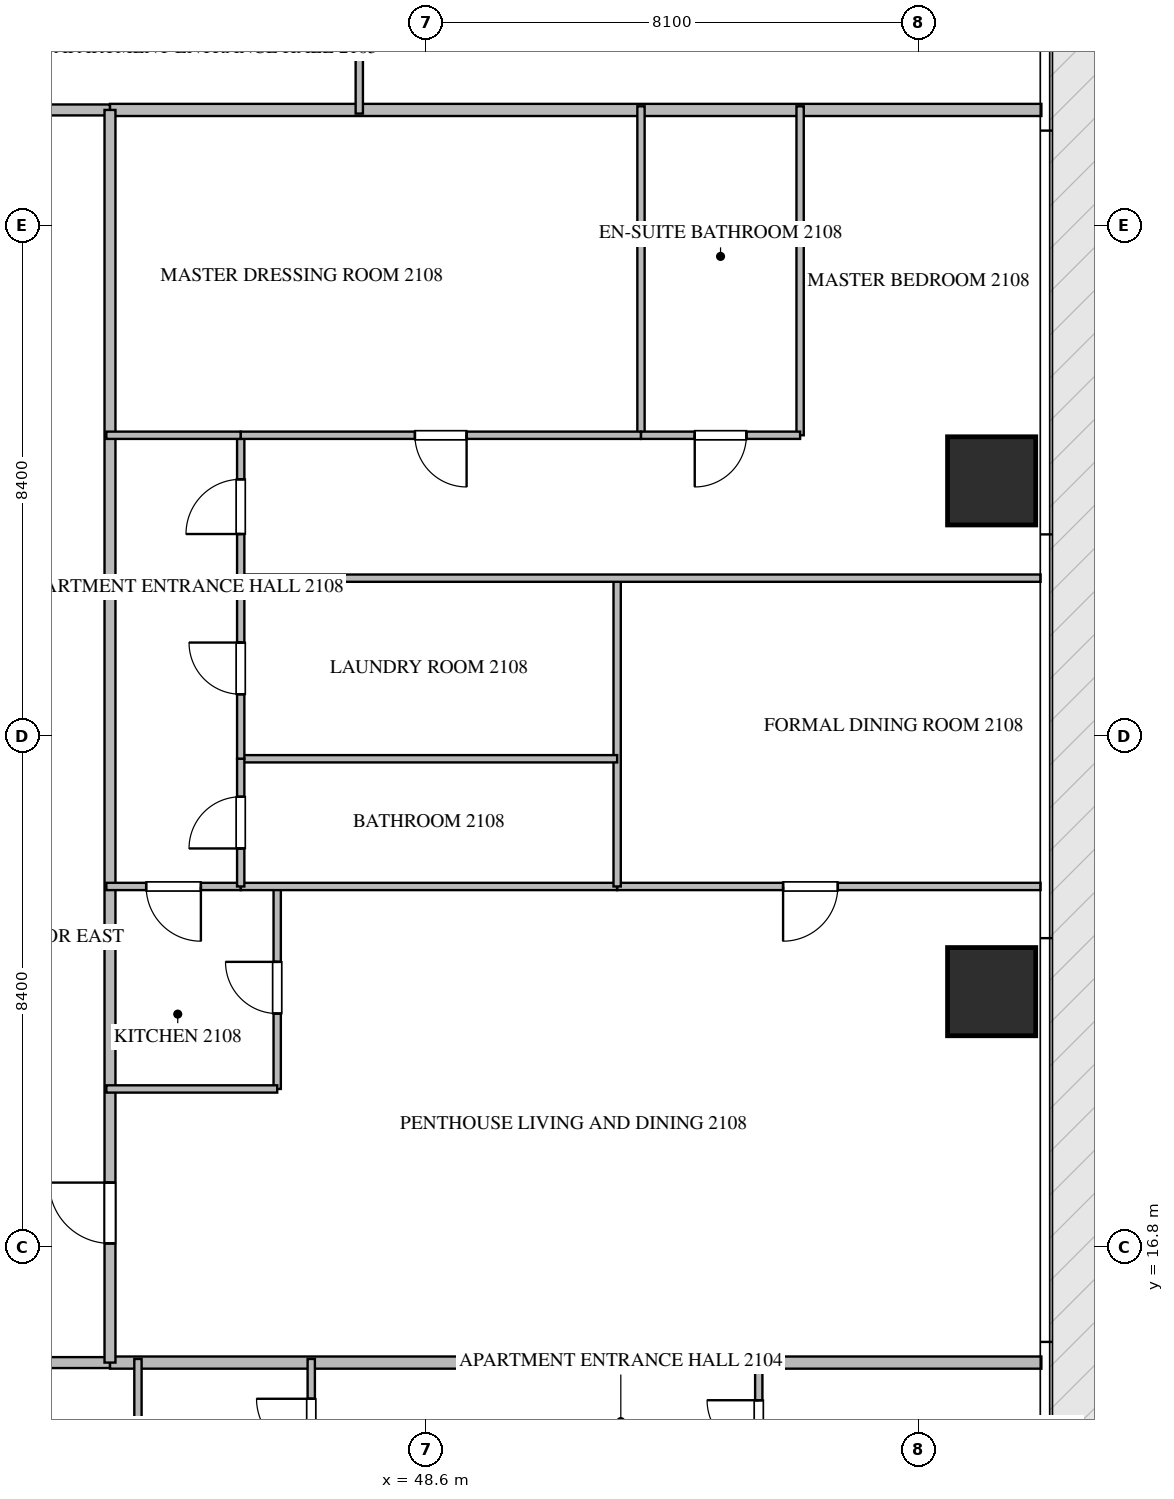
"""IFC4 building model, lengths in metres.
Left out: names, types, materials, properties, quantities, classifications, styles, units other than length and angle.
Written with IfcOpenShell. Run it as: python <this file> out.ifc"""

import sys

from ifc_helpers import new_model, si_unit, direction, frame, frame_2d, origin, origin_2d, place, context, subcontext, project, spatial, rectangle, extrude, source, transform, mapped, element, fill, save


model = new_model("IFC4")
c1 = context("Model", 3, precision=1e-05, world=origin(), true_north=direction((0.0, 1.0)))
c2 = subcontext(c1, "Body", "Model", "MODEL_VIEW")
j1 = project(units=[si_unit("LENGTHUNIT", "METRE"), si_unit("PLANEANGLEUNIT", "RADIAN")], contexts=[c1])
p1 = place(None, origin())
s1 = spatial("IfcSite", under=j1, at=p1, CompositionType="ELEMENT")
p2 = place(p1, origin())
s2 = spatial("IfcBuilding", under=s1, at=p2, CompositionType="ELEMENT")
p3 = place(p2, frame((0.0, 0.0, 86.7)))
s3 = spatial("IfcBuildingStorey", under=s2, at=p3, CompositionType="ELEMENT", Elevation=86.7)
m1 = source(origin(), c2, "Body", "SweptSolid", [
    extrude(rectangle(XDim=1.45, YDim=1.45, at=origin_2d()), origin(), (0.0, 0.0, 1.0), 3.75),
])
for number, where, z_axis, x_axis in (
    (1, (57.9, 21.0, -0.26), (0.0, 0.0, 1.0), (1.0, 0.0, 0.0)),
    (2, (57.9, 29.4, -0.26), (0.0, 0.0, 1.0), (1.0, 0.0, 0.0)),
):
    element("IfcColumn", number, at=place(p3, frame(where, z_axis=z_axis, x_axis=x_axis)), inside=s3, PredefinedType="COLUMN", context=c2, shape_type="MappedRepresentation", body=[
        mapped(m1, transform((0.0, 0.0, 0.0), scale=1.0)),
    ])
for number, where, z_axis, x_axis in (
    (3, (43.4, 14.9, 0.0), (0.0, 0.0, 1.0), (1.0, 0.0, 0.0)),
    (4, (43.4, 35.5, 0.0), (0.0, 0.0, 1.0), (1.0, 0.0, 0.0)),
):
    element("IfcWall", number, at=place(p3, frame(where, z_axis=z_axis, x_axis=x_axis)), inside=s3, PredefinedType="PARTITIONING", context=c2, shape_type="SweptSolid", body=[
        extrude(rectangle(XDim=15.318, YDim=0.2, at=frame_2d((7.659, 0.0))), origin(), (0.0, 0.0, 1.0), 3.49),
    ])
p4 = place(p3, frame((21.402, 14.9, 0.0), z_axis=(0.0, 0.0, 1.0), x_axis=(1.0, 0.0, 0.0)))
e5 = element("IfcWall", 5, at=p4, inside=s3, PredefinedType="PARTITIONING", context=c2, shape_type="SweptSolid", body=[
    extrude(rectangle(XDim=21.996, YDim=0.18, at=frame_2d((10.998, 0.0))), origin(), (0.0, 0.0, 1.0), 3.49),
])
p5 = place(p4, frame((1.82, 0.0, 0.0)))
e6 = element("IfcOpeningElement", 6, at=p5, cuts=e5, PredefinedType="OPENING", context=c2, shape_type="SweptSolid", body=[
    extrude(rectangle(XDim=1.0, YDim=2.15, at=frame_2d((0.5, 1.075))), frame((0.0, 0.1, 0.0), z_axis=(0.0, -1.0, 0.0), x_axis=(1.0, 0.0, 0.0)), (0.0, 0.0, 1.0), 0.2),
])
p6 = place(p4, frame((5.144, 0.0, 0.0)))
e7 = element("IfcOpeningElement", 7, at=p6, cuts=e5, PredefinedType="OPENING", context=c2, shape_type="SweptSolid", body=[
    extrude(rectangle(XDim=1.0, YDim=2.15, at=frame_2d((0.5, 1.075))), frame((0.0, 0.1, 0.0), z_axis=(0.0, -1.0, 0.0), x_axis=(1.0, 0.0, 0.0)), (0.0, 0.0, 1.0), 0.2),
])
p7 = place(p4, frame((11.758, 0.0, 0.0)))
e8 = element("IfcOpeningElement", 8, at=p7, cuts=e5, PredefinedType="OPENING", context=c2, shape_type="SweptSolid", body=[
    extrude(rectangle(XDim=1.0, YDim=2.15, at=frame_2d((0.5, 1.075))), frame((0.0, 0.1, 0.0), z_axis=(0.0, -1.0, 0.0), x_axis=(1.0, 0.0, 0.0)), (0.0, 0.0, 1.0), 0.2),
])
p8 = place(p4, frame((18.896, 0.0, 0.0)))
e9 = element("IfcOpeningElement", 9, at=p8, cuts=e5, PredefinedType="OPENING", context=c2, shape_type="SweptSolid", body=[
    extrude(rectangle(XDim=1.0, YDim=2.15, at=frame_2d((0.5, 1.075))), frame((0.0, 0.1, 0.0), z_axis=(0.0, -1.0, 0.0), x_axis=(1.0, 0.0, 0.0)), (0.0, 0.0, 1.0), 0.2),
])
p9 = place(p3, frame((21.402, 35.5, 0.0), z_axis=(0.0, 0.0, 1.0), x_axis=(1.0, 0.0, 0.0)))
e10 = element("IfcWall", 10, at=p9, inside=s3, PredefinedType="PARTITIONING", context=c2, shape_type="SweptSolid", body=[
    extrude(rectangle(XDim=21.996, YDim=0.18, at=frame_2d((10.998, 0.0))), origin(), (0.0, 0.0, 1.0), 3.49),
])
p10 = place(p9, frame((15.222, 0.0, 0.0)))
e11 = element("IfcOpeningElement", 11, at=p10, cuts=e10, PredefinedType="OPENING", context=c2, shape_type="SweptSolid", body=[
    extrude(rectangle(XDim=1.0, YDim=2.15, at=frame_2d((0.5, 1.075))), frame((0.0, 0.1, 0.0), z_axis=(0.0, -1.0, 0.0), x_axis=(1.0, 0.0, 0.0)), (0.0, 0.0, 1.0), 0.2),
])
p11 = place(p3, frame((43.4, 14.9, 0.0), z_axis=(0.0, 0.0, 1.0), x_axis=(0.0, 1.0, 0.0)))
e12 = element("IfcWall", 12, at=p11, inside=s3, PredefinedType="PARTITIONING", context=c2, shape_type="SweptSolid", body=[
    extrude(rectangle(XDim=20.6, YDim=0.18, at=frame_2d((10.3, 0.0))), origin(), (0.0, 0.0, 1.0), 3.49),
])
p12 = place(p11, frame((1.96, 0.0, 0.0)))
e13 = element("IfcOpeningElement", 13, at=p12, cuts=e12, PredefinedType="OPENING", context=c2, shape_type="SweptSolid", body=[
    extrude(rectangle(XDim=1.0, YDim=2.15, at=frame_2d((0.5, 1.075))), frame((0.0, 0.1, 0.0), z_axis=(0.0, -1.0, 0.0), x_axis=(1.0, 0.0, 0.0)), (0.0, 0.0, 1.0), 0.2),
])
p13 = place(p3, frame((43.86, 12.15, 0.0), z_axis=(0.0, 0.0, 1.0), x_axis=(0.0, 1.0, 0.0)))
e14 = element("IfcWall", 14, at=p13, inside=s3, PredefinedType="PARTITIONING", context=c2, shape_type="SweptSolid", body=[
    extrude(rectangle(XDim=2.81, YDim=0.12, at=frame_2d((1.405, 0.0))), origin(), (0.0, 0.0, 1.0), 3.49),
])
p14 = place(p3, frame((46.71, 12.75, 0.0), z_axis=(0.0, 0.0, 1.0), x_axis=(0.0, 1.0, 0.0)))
e15 = element("IfcWall", 15, at=p14, inside=s3, PredefinedType="PARTITIONING", context=c2, shape_type="SweptSolid", body=[
    extrude(rectangle(XDim=2.21, YDim=0.12, at=frame_2d((1.105, 0.0))), origin(), (0.0, 0.0, 1.0), 3.49),
])
p15 = place(p14, frame((0.655, 0.0, 0.0)))
e16 = element("IfcOpeningElement", 16, at=p15, cuts=e15, PredefinedType="OPENING", context=c2, shape_type="SweptSolid", body=[
    extrude(rectangle(XDim=0.9, YDim=2.1, at=frame_2d((0.45, 1.05))), frame((0.0, 0.07, 0.0), z_axis=(0.0, -1.0, 0.0), x_axis=(1.0, 0.0, 0.0)), (0.0, 0.0, 1.0), 0.14),
])
p16 = place(p3, frame((54.07, 12.752, 0.0), z_axis=(0.0, 0.0, 1.0), x_axis=(0.0, 1.0, 0.0)))
e17 = element("IfcWall", 17, at=p16, inside=s3, PredefinedType="PARTITIONING", context=c2, shape_type="SweptSolid", body=[
    extrude(rectangle(XDim=2.208, YDim=0.12, at=frame_2d((1.104, 0.0))), origin(), (0.0, 0.0, 1.0), 3.49),
])
p17 = place(p16, frame((0.679, 0.0, 0.0)))
e18 = element("IfcOpeningElement", 18, at=p17, cuts=e17, PredefinedType="OPENING", context=c2, shape_type="SweptSolid", body=[
    extrude(rectangle(XDim=0.85, YDim=2.1, at=frame_2d((0.425, 1.05))), frame((0.0, 0.07, 0.0), z_axis=(0.0, -1.0, 0.0), x_axis=(1.0, 0.0, 0.0)), (0.0, 0.0, 1.0), 0.14),
])
p18 = place(p3, frame((47.5, 37.648, 0.0), z_axis=(0.0, 0.0, 1.0), x_axis=(0.0, -1.0, 0.0)))
e19 = element("IfcWall", 19, at=p18, inside=s3, PredefinedType="PARTITIONING", context=c2, shape_type="SweptSolid", body=[
    extrude(rectangle(XDim=2.208, YDim=0.12, at=frame_2d((1.104, 0.0))), origin(), (0.0, 0.0, 1.0), 3.49),
])
p19 = place(p3, frame((46.15, 19.4, 0.0), z_axis=(0.0, 0.0, 1.0), x_axis=(0.0, 1.0, 0.0)))
e20 = element("IfcWall", 20, at=p19, inside=s3, PredefinedType="PARTITIONING", context=c2, shape_type="SweptSolid", body=[
    extrude(rectangle(XDim=3.33, YDim=0.12, at=frame_2d((1.665, 0.0))), origin(), (0.0, 0.0, 1.0), 3.49),
])
p20 = place(p19, frame((1.24, 0.0, 0.0)))
e21 = element("IfcOpeningElement", 21, at=p20, cuts=e20, PredefinedType="OPENING", context=c2, shape_type="SweptSolid", body=[
    extrude(rectangle(XDim=0.85, YDim=2.1, at=frame_2d((0.425, 1.05))), frame((0.0, 0.07, 0.0), z_axis=(0.0, -1.0, 0.0), x_axis=(1.0, 0.0, 0.0)), (0.0, 0.0, 1.0), 0.14),
])
p21 = place(p3, frame((46.15, 19.4, 0.0), z_axis=(0.0, 0.0, 1.0), x_axis=(-1.0, 0.0, 0.0)))
e22 = element("IfcWall", 22, at=p21, inside=s3, PredefinedType="PARTITIONING", context=c2, shape_type="SweptSolid", body=[
    extrude(rectangle(XDim=2.81, YDim=0.12, at=frame_2d((1.405, 0.0))), origin(), (0.0, 0.0, 1.0), 3.49),
])
p22 = place(p3, frame((45.55, 22.73, 0.0), z_axis=(0.0, 0.0, 1.0), x_axis=(-1.0, 0.0, 0.0)))
e23 = element("IfcWall", 23, at=p22, inside=s3, PredefinedType="PARTITIONING", context=c2, shape_type="SweptSolid", body=[
    extrude(rectangle(XDim=2.21, YDim=0.12, at=frame_2d((1.105, 0.0))), origin(), (0.0, 0.0, 1.0), 3.49),
])
p23 = place(p22, frame((0.655, 0.0, 0.0)))
e24 = element("IfcOpeningElement", 24, at=p23, cuts=e23, PredefinedType="OPENING", context=c2, shape_type="SweptSolid", body=[
    extrude(rectangle(XDim=0.9, YDim=2.1, at=frame_2d((0.45, 1.05))), frame((0.0, 0.07, 0.0), z_axis=(0.0, -1.0, 0.0), x_axis=(1.0, 0.0, 0.0)), (0.0, 0.0, 1.0), 0.14),
])
p24 = place(p3, frame((58.705, 22.73, 0.0), z_axis=(0.0, 0.0, 1.0), x_axis=(-1.0, 0.0, 0.0)))
e25 = element("IfcWall", 25, at=p24, inside=s3, PredefinedType="PARTITIONING", context=c2, shape_type="SweptSolid", body=[
    extrude(rectangle(XDim=6.964, YDim=0.12, at=frame_2d((3.482, 0.0))), origin(), (0.0, 0.0, 1.0), 3.49),
])
p25 = place(p24, frame((3.335, 0.0, 0.0)))
e26 = element("IfcOpeningElement", 26, at=p25, cuts=e25, PredefinedType="OPENING", context=c2, shape_type="SweptSolid", body=[
    extrude(rectangle(XDim=0.9, YDim=2.1, at=frame_2d((0.45, 1.05))), frame((0.0, 0.07, 0.0), z_axis=(0.0, -1.0, 0.0), x_axis=(1.0, 0.0, 0.0)), (0.0, 0.0, 1.0), 0.14),
])
p26 = place(p3, frame((51.739, 22.73, 0.0), z_axis=(0.0, 0.0, 1.0), x_axis=(-1.0, 0.0, 0.0)))
e27 = element("IfcWall", 27, at=p26, inside=s3, PredefinedType="PARTITIONING", context=c2, shape_type="SweptSolid", body=[
    extrude(rectangle(XDim=6.187, YDim=0.12, at=frame_2d((3.094, 0.0))), origin(), (0.0, 0.0, 1.0), 3.49),
])
p27 = place(p3, frame((51.741, 22.73, 0.0), z_axis=(0.0, 0.0, 1.0), x_axis=(0.0, 1.0, 0.0)))
e28 = element("IfcWall", 28, at=p27, inside=s3, PredefinedType="PARTITIONING", context=c2, shape_type="SweptSolid", body=[
    extrude(rectangle(XDim=5.07, YDim=0.12, at=frame_2d((2.535, 0.0))), origin(), (0.0, 0.0, 1.0), 3.49),
])
p28 = place(p3, frame((58.705, 27.8, 0.0), z_axis=(0.0, 0.0, 1.0), x_axis=(-1.0, 0.0, 0.0)))
e29 = element("IfcWall", 29, at=p28, inside=s3, PredefinedType="PARTITIONING", context=c2, shape_type="SweptSolid", body=[
    extrude(rectangle(XDim=13.155, YDim=0.12, at=frame_2d((6.578, 0.0))), origin(), (0.0, 0.0, 1.0), 3.49),
])
p29 = place(p3, frame((51.741, 24.83, 0.0), z_axis=(0.0, 0.0, 1.0), x_axis=(-1.0, 0.0, 0.0)))
e30 = element("IfcWall", 30, at=p29, inside=s3, PredefinedType="PARTITIONING", context=c2, shape_type="SweptSolid", body=[
    extrude(rectangle(XDim=6.191, YDim=0.12, at=frame_2d((3.095, 0.0))), origin(), (0.0, 0.0, 1.0), 3.49),
])
p30 = place(p3, frame((45.55, 22.73, 0.0), z_axis=(0.0, 0.0, 1.0), x_axis=(0.0, 1.0, 0.0)))
e31 = element("IfcWall", 31, at=p30, inside=s3, PredefinedType="PARTITIONING", context=c2, shape_type="SweptSolid", body=[
    extrude(rectangle(XDim=2.1, YDim=0.12, at=frame_2d((1.05, 0.0))), origin(), (0.0, 0.0, 1.0), 3.49),
])
p31 = place(p30, frame((0.625, 0.0, 0.0)))
e32 = element("IfcOpeningElement", 32, at=p31, cuts=e31, PredefinedType="OPENING", context=c2, shape_type="SweptSolid", body=[
    extrude(rectangle(XDim=0.85, YDim=2.1, at=frame_2d((0.425, 1.05))), frame((0.0, 0.07, 0.0), z_axis=(0.0, -1.0, 0.0), x_axis=(1.0, 0.0, 0.0)), (0.0, 0.0, 1.0), 0.14),
])
p32 = place(p3, frame((45.55, 24.832, 0.0), z_axis=(0.0, 0.0, 1.0), x_axis=(0.0, 1.0, 0.0)))
e33 = element("IfcWall", 33, at=p32, inside=s3, PredefinedType="PARTITIONING", context=c2, shape_type="SweptSolid", body=[
    extrude(rectangle(XDim=2.968, YDim=0.12, at=frame_2d((1.484, 0.0))), origin(), (0.0, 0.0, 1.0), 3.49),
])
p33 = place(p32, frame((1.059, 0.0, 0.0)))
e34 = element("IfcOpeningElement", 34, at=p33, cuts=e33, PredefinedType="OPENING", context=c2, shape_type="SweptSolid", body=[
    extrude(rectangle(XDim=0.85, YDim=2.1, at=frame_2d((0.425, 1.05))), frame((0.0, 0.07, 0.0), z_axis=(0.0, -1.0, 0.0), x_axis=(1.0, 0.0, 0.0)), (0.0, 0.0, 1.0), 0.14),
])
p34 = place(p3, frame((45.55, 27.802, 0.0), z_axis=(0.0, 0.0, 1.0), x_axis=(0.0, 1.0, 0.0)))
e35 = element("IfcWall", 35, at=p34, inside=s3, PredefinedType="PARTITIONING", context=c2, shape_type="SweptSolid", body=[
    extrude(rectangle(XDim=2.348, YDim=0.12, at=frame_2d((1.174, 0.0))), origin(), (0.0, 0.0, 1.0), 3.49),
])
p35 = place(p34, frame((0.724, 0.0, 0.0)))
e36 = element("IfcOpeningElement", 36, at=p35, cuts=e35, PredefinedType="OPENING", context=c2, shape_type="SweptSolid", body=[
    extrude(rectangle(XDim=0.9, YDim=2.1, at=frame_2d((0.45, 1.05))), frame((0.0, 0.07, 0.0), z_axis=(0.0, -1.0, 0.0), x_axis=(1.0, 0.0, 0.0)), (0.0, 0.0, 1.0), 0.14),
])
for number, where, z_axis, x_axis in (
    (37, (54.75, 30.15, 0.0), (0.0, 0.0, 1.0), (0.0, 1.0, 0.0)),
    (38, (52.133, 30.15, 0.0), (0.0, 0.0, 1.0), (0.0, 1.0, 0.0)),
):
    element("IfcWall", number, at=place(p3, frame(where, z_axis=z_axis, x_axis=x_axis)), inside=s3, PredefinedType="PARTITIONING", context=c2, shape_type="SweptSolid", body=[
        extrude(rectangle(XDim=5.41, YDim=0.12, at=frame_2d((2.705, 0.0))), origin(), (0.0, 0.0, 1.0), 3.49),
    ])
p36 = place(p3, frame((54.75, 30.15, 0.0), z_axis=(0.0, 0.0, 1.0), x_axis=(-1.0, 0.0, 0.0)))
e39 = element("IfcWall", 39, at=p36, inside=s3, PredefinedType="PARTITIONING", context=c2, shape_type="SweptSolid", body=[
    extrude(rectangle(XDim=2.617, YDim=0.12, at=frame_2d((1.309, 0.0))), origin(), (0.0, 0.0, 1.0), 3.49),
])
p37 = place(p36, frame((0.883, 0.0, 0.0)))
e40 = element("IfcOpeningElement", 40, at=p37, cuts=e39, PredefinedType="OPENING", context=c2, shape_type="SweptSolid", body=[
    extrude(rectangle(XDim=0.85, YDim=2.1, at=frame_2d((0.425, 1.05))), frame((0.0, 0.07, 0.0), z_axis=(0.0, -1.0, 0.0), x_axis=(1.0, 0.0, 0.0)), (0.0, 0.0, 1.0), 0.14),
])
p38 = place(p3, frame((52.131, 30.15, 0.0), z_axis=(0.0, 0.0, 1.0), x_axis=(-1.0, 0.0, 0.0)))
e41 = element("IfcWall", 41, at=p38, inside=s3, PredefinedType="PARTITIONING", context=c2, shape_type="SweptSolid", body=[
    extrude(rectangle(XDim=6.581, YDim=0.12, at=frame_2d((3.291, 0.0))), origin(), (0.0, 0.0, 1.0), 3.49),
])
p39 = place(p38, frame((2.866, 0.0, 0.0)))
e42 = element("IfcOpeningElement", 42, at=p39, cuts=e41, PredefinedType="OPENING", context=c2, shape_type="SweptSolid", body=[
    extrude(rectangle(XDim=0.85, YDim=2.1, at=frame_2d((0.425, 1.05))), frame((0.0, 0.07, 0.0), z_axis=(0.0, -1.0, 0.0), x_axis=(1.0, 0.0, 0.0)), (0.0, 0.0, 1.0), 0.14),
])
p40 = place(p3, frame((45.548, 30.15, 0.0), z_axis=(0.0, 0.0, 1.0), x_axis=(-1.0, 0.0, 0.0)))
e43 = element("IfcWall", 43, at=p40, inside=s3, PredefinedType="PARTITIONING", context=c2, shape_type="SweptSolid", body=[
    extrude(rectangle(XDim=2.208, YDim=0.12, at=frame_2d((1.104, 0.0))), origin(), (0.0, 0.0, 1.0), 3.49),
])
m2 = source(origin(), c2, "Body", "SweptSolid", [
    extrude(rectangle(XDim=1.0, YDim=2.15, at=frame_2d((0.5, 1.075))), frame((0.0, 0.025, 0.0), z_axis=(0.0, -1.0, 0.0), x_axis=(1.0, 0.0, 0.0)), (0.0, 0.0, 1.0), 0.05),
])
p41 = place(p12, origin())
e44 = element("IfcDoor", 44, at=p41, inside=s3, OperationType="SINGLE_SWING_RIGHT", PredefinedType="DOOR", context=c2, shape_type="MappedRepresentation", body=[
    mapped(m2, transform((0.0, 0.0, 0.0), scale=1.0)),
])
fill(e13, e44)
m3 = source(origin(), c2, "Body", "SweptSolid", [
    extrude(rectangle(XDim=0.9, YDim=2.1, at=frame_2d((0.45, 1.05))), frame((0.0, 0.025, 0.0), z_axis=(0.0, -1.0, 0.0), x_axis=(1.0, 0.0, 0.0)), (0.0, 0.0, 1.0), 0.05),
])
p42 = place(p15, origin())
e45 = element("IfcDoor", 45, at=p42, inside=s3, OperationType="SINGLE_SWING_RIGHT", PredefinedType="DOOR", context=c2, shape_type="MappedRepresentation", body=[
    mapped(m3, transform((0.0, 0.0, 0.0), scale=1.0)),
])
fill(e16, e45)
m4 = source(origin(), c2, "Body", "SweptSolid", [
    extrude(rectangle(XDim=0.85, YDim=2.1, at=frame_2d((0.425, 1.05))), frame((0.0, 0.025, 0.0), z_axis=(0.0, -1.0, 0.0), x_axis=(1.0, 0.0, 0.0)), (0.0, 0.0, 1.0), 0.05),
])
p43 = place(p17, origin())
e46 = element("IfcDoor", 46, at=p43, inside=s3, OperationType="SINGLE_SWING_RIGHT", PredefinedType="DOOR", context=c2, shape_type="MappedRepresentation", body=[
    mapped(m4, transform((0.0, 0.0, 0.0), scale=1.0)),
])
fill(e18, e46)
p44 = place(p20, origin())
e47 = element("IfcDoor", 47, at=p44, inside=s3, OperationType="SINGLE_SWING_RIGHT", PredefinedType="DOOR", context=c2, shape_type="MappedRepresentation", body=[
    mapped(m4, transform((0.0, 0.0, 0.0), scale=1.0)),
])
fill(e21, e47)
p45 = place(p23, origin())
e48 = element("IfcDoor", 48, at=p45, inside=s3, OperationType="SINGLE_SWING_LEFT", PredefinedType="DOOR", context=c2, shape_type="MappedRepresentation", body=[
    mapped(m3, transform((0.0, 0.0, 0.0), scale=1.0)),
])
fill(e24, e48)
p46 = place(p25, origin())
e49 = element("IfcDoor", 49, at=p46, inside=s3, OperationType="SINGLE_SWING_RIGHT", PredefinedType="DOOR", context=c2, shape_type="MappedRepresentation", body=[
    mapped(m3, transform((0.0, 0.0, 0.0), scale=1.0)),
])
fill(e26, e49)
p47 = place(p31, origin())
e50 = element("IfcDoor", 50, at=p47, inside=s3, OperationType="SINGLE_SWING_LEFT", PredefinedType="DOOR", context=c2, shape_type="MappedRepresentation", body=[
    mapped(m4, transform((0.0, 0.0, 0.0), scale=1.0)),
])
fill(e32, e50)
p48 = place(p33, origin())
e51 = element("IfcDoor", 51, at=p48, inside=s3, OperationType="SINGLE_SWING_RIGHT", PredefinedType="DOOR", context=c2, shape_type="MappedRepresentation", body=[
    mapped(m4, transform((0.0, 0.0, 0.0), scale=1.0)),
])
fill(e34, e51)
p49 = place(p35, origin())
e52 = element("IfcDoor", 52, at=p49, inside=s3, OperationType="SINGLE_SWING_LEFT", PredefinedType="DOOR", context=c2, shape_type="MappedRepresentation", body=[
    mapped(m3, transform((0.0, 0.0, 0.0), scale=1.0)),
])
fill(e36, e52)
p50 = place(p37, origin())
e53 = element("IfcDoor", 53, at=p50, inside=s3, OperationType="SINGLE_SWING_RIGHT", PredefinedType="DOOR", context=c2, shape_type="MappedRepresentation", body=[
    mapped(m4, transform((0.0, 0.0, 0.0), scale=1.0)),
])
fill(e40, e53)
p51 = place(p39, origin())
e54 = element("IfcDoor", 54, at=p51, inside=s3, OperationType="SINGLE_SWING_LEFT", PredefinedType="DOOR", context=c2, shape_type="MappedRepresentation", body=[
    mapped(m4, transform((0.0, 0.0, 0.0), scale=1.0)),
])
fill(e42, e54)
save(model, sys.argv[1])
